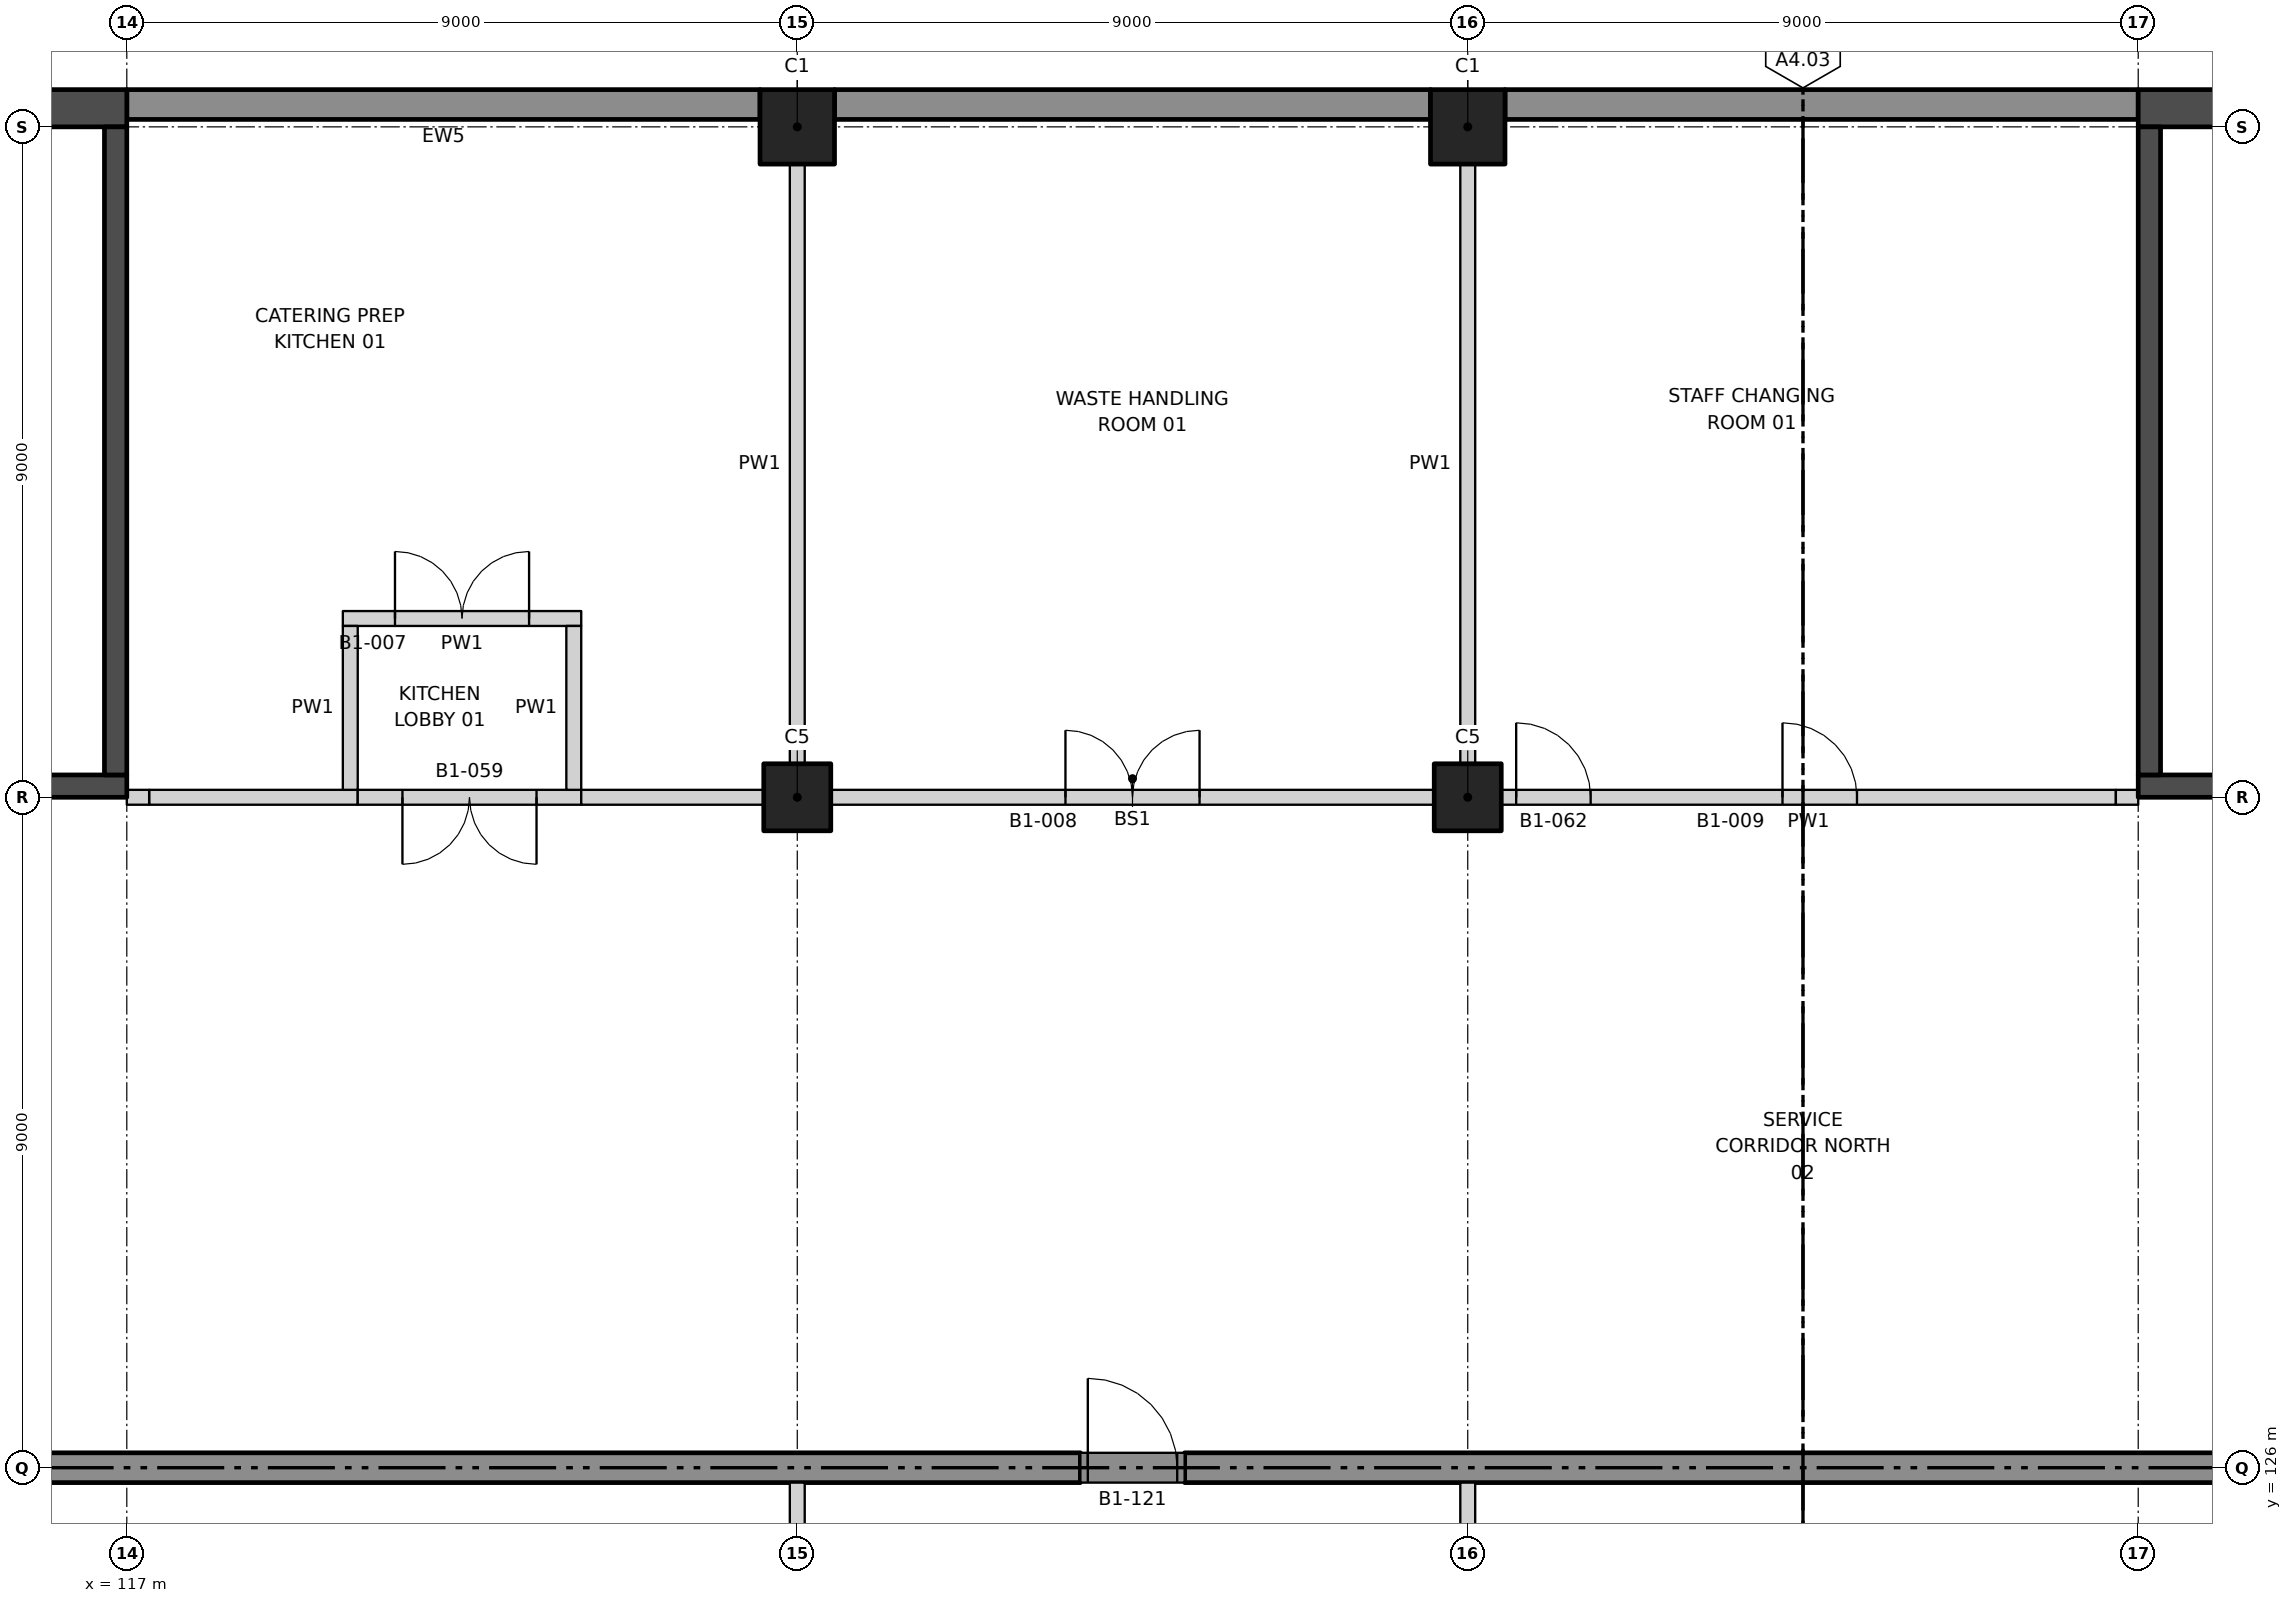
"""IFC4 building model, lengths in metres.
Left out: names, types, materials, properties, quantities, classifications, styles, units other than length and angle.
Written with IfcOpenShell. Run it as: python <this file> out.ifc"""

import sys

from ifc_helpers import new_model, si_unit, direction, frame, frame_2d, origin, origin_2d, place, context, subcontext, project, spatial, rectangle, extrude, element, fill, save


model = new_model("IFC4")
c1 = context("Model", 3, precision=1e-05, world=origin(), true_north=direction((0.0, 1.0)))
c2 = subcontext(c1, "Body", "Model", "MODEL_VIEW")
j1 = project(units=[si_unit("LENGTHUNIT", "METRE"), si_unit("PLANEANGLEUNIT", "RADIAN")], contexts=[c1])
p1 = place(None, origin())
s1 = spatial("IfcSite", under=j1, at=p1, CompositionType="ELEMENT")
p2 = place(p1, origin())
s2 = spatial("IfcBuilding", under=s1, at=p2, CompositionType="ELEMENT")
p3 = place(p2, frame((0.0, 0.0, -6.0)))
s3 = spatial("IfcBuildingStorey", under=s2, at=p3, CompositionType="ELEMENT", Elevation=-6.0)
for number, where, z_axis, x_axis in (
    (1, (126.0, 144.0, 0.0), (0.0, 0.0, 1.0), (1.0, 0.0, 0.0)),
    (2, (135.0, 144.0, 0.0), (0.0, 0.0, 1.0), (1.0, 0.0, 0.0)),
):
    element("IfcColumn", number, at=place(p3, frame(where, z_axis=z_axis, x_axis=x_axis)), inside=s3, PredefinedType="COLUMN", context=c2, shape_type="SweptSolid", body=[
        extrude(rectangle(XDim=1.0, YDim=1.0, at=origin_2d()), origin(), (0.0, 0.0, 1.0), 6.0),
    ])
for number, where, z_axis, x_axis in (
    (3, (126.0, 135.0, 0.0), (0.0, 0.0, 1.0), (1.0, 0.0, 0.0)),
    (4, (135.0, 135.0, 0.0), (0.0, 0.0, 1.0), (1.0, 0.0, 0.0)),
):
    element("IfcColumn", number, at=place(p3, frame(where, z_axis=z_axis, x_axis=x_axis)), inside=s3, PredefinedType="COLUMN", context=c2, shape_type="SweptSolid", body=[
        extrude(rectangle(XDim=0.9, YDim=0.9, at=origin_2d()), origin(), (0.0, 0.0, 1.0), 6.0),
    ])
for number, where, z_axis, x_axis in (
    (5, (171.0, 126.0, 0.0), (0.0, 0.0, 1.0), (-1.0, 0.0, 0.0)),
    (6, (129.8, 126.0, 0.0), (0.0, 0.0, 1.0), (-1.0, 0.0, 0.0)),
):
    element("IfcWall", number, at=place(p3, frame(where, z_axis=z_axis, x_axis=x_axis)), inside=s3, PredefinedType="SOLIDWALL", context=c2, shape_type="SweptSolid", body=[
        extrude(rectangle(XDim=39.8, YDim=0.4, at=frame_2d((19.9, 0.0))), origin(), (0.0, 0.0, 1.0), 6.0),
    ])
p4 = place(p3, frame((129.8, 126.0, 0.0), z_axis=(0.0, 0.0, 1.0), x_axis=(1.0, 0.0, 0.0)))
e7 = element("IfcWall", 7, at=p4, inside=s3, PredefinedType="SOLIDWALL", context=c2, shape_type="SweptSolid", body=[
    extrude(rectangle(XDim=1.4, YDim=0.4, at=frame_2d((0.7, 0.0))), origin(), (0.0, 0.0, 1.0), 5.0),
])
p5 = place(p4, frame((0.1, 0.0, 0.0)))
e8 = element("IfcOpeningElement", 8, at=p5, cuts=e7, PredefinedType="OPENING", context=c2, shape_type="SweptSolid", body=[
    extrude(rectangle(XDim=1.2, YDim=2.1, at=frame_2d((0.6, 1.05))), frame((0.0, 0.21, 0.0), z_axis=(0.0, -1.0, 0.0), x_axis=(1.0, 0.0, 0.0)), (0.0, 0.0, 1.0), 0.42),
])
p6 = place(p3, frame((117.3, 135.0, 0.0), z_axis=(0.0, 0.0, 1.0), x_axis=(1.0, 0.0, 0.0)))
e9 = element("IfcWall", 9, at=p6, inside=s3, PredefinedType="PARTITIONING", context=c2, shape_type="SweptSolid", body=[
    extrude(rectangle(XDim=2.8, YDim=0.2, at=frame_2d((1.4, 0.0))), origin(), (0.0, 0.0, 1.0), 4.65),
])
p7 = place(p3, frame((120.1, 135.0, 0.0), z_axis=(0.0, 0.0, 1.0), x_axis=(1.0, 0.0, 0.0)))
e10 = element("IfcWall", 10, at=p7, inside=s3, PredefinedType="PARTITIONING", context=c2, shape_type="SweptSolid", body=[
    extrude(rectangle(XDim=3.0, YDim=0.2, at=frame_2d((1.5, 0.0))), origin(), (0.0, 0.0, 1.0), 4.65),
])
p8 = place(p7, frame((0.6, 0.0, 0.0)))
e11 = element("IfcOpeningElement", 11, at=p8, cuts=e10, PredefinedType="OPENING", context=c2, shape_type="SweptSolid", body=[
    extrude(rectangle(XDim=1.8, YDim=2.1, at=frame_2d((0.9, 1.05))), frame((0.0, 0.11, 0.0), z_axis=(0.0, -1.0, 0.0), x_axis=(1.0, 0.0, 0.0)), (0.0, 0.0, 1.0), 0.22),
])
p9 = place(p3, frame((123.1, 135.0, 0.0), z_axis=(0.0, 0.0, 1.0), x_axis=(1.0, 0.0, 0.0)))
e12 = element("IfcWall", 12, at=p9, inside=s3, PredefinedType="PARTITIONING", context=c2, shape_type="SweptSolid", body=[
    extrude(rectangle(XDim=2.45, YDim=0.2, at=frame_2d((1.225, 0.0))), origin(), (0.0, 0.0, 1.0), 4.65),
])
p10 = place(p3, frame((126.45, 135.0, 0.0), z_axis=(0.0, 0.0, 1.0), x_axis=(1.0, 0.0, 0.0)))
e13 = element("IfcWall", 13, at=p10, inside=s3, PredefinedType="PARTITIONING", context=c2, shape_type="SweptSolid", body=[
    extrude(rectangle(XDim=8.1, YDim=0.2, at=frame_2d((4.05, 0.0))), origin(), (0.0, 0.0, 1.0), 4.65),
])
p11 = place(p10, frame((3.15, 0.0, 0.0)))
e14 = element("IfcOpeningElement", 14, at=p11, cuts=e13, PredefinedType="OPENING", context=c2, shape_type="SweptSolid", body=[
    extrude(rectangle(XDim=1.8, YDim=2.1, at=frame_2d((0.9, 1.05))), frame((0.0, 0.11, 0.0), z_axis=(0.0, -1.0, 0.0), x_axis=(1.0, 0.0, 0.0)), (0.0, 0.0, 1.0), 0.22),
])
p12 = place(p3, frame((135.45, 135.0, 0.0), z_axis=(0.0, 0.0, 1.0), x_axis=(1.0, 0.0, 0.0)))
e15 = element("IfcWall", 15, at=p12, inside=s3, PredefinedType="PARTITIONING", context=c2, shape_type="SweptSolid", body=[
    extrude(rectangle(XDim=8.25, YDim=0.2, at=frame_2d((4.125, 0.0))), origin(), (0.0, 0.0, 1.0), 4.65),
])
p13 = place(p12, frame((3.775, 0.0, 0.0)))
e16 = element("IfcOpeningElement", 16, at=p13, cuts=e15, PredefinedType="OPENING", context=c2, shape_type="SweptSolid", body=[
    extrude(rectangle(XDim=1.0, YDim=2.1, at=frame_2d((0.5, 1.05))), frame((0.0, 0.11, 0.0), z_axis=(0.0, -1.0, 0.0), x_axis=(1.0, 0.0, 0.0)), (0.0, 0.0, 1.0), 0.22),
])
p14 = place(p12, frame((0.2, 0.0, 0.0)))
e17 = element("IfcOpeningElement", 17, at=p14, cuts=e15, PredefinedType="OPENING", context=c2, shape_type="SweptSolid", body=[
    extrude(rectangle(XDim=1.0, YDim=2.1, at=frame_2d((0.5, 1.05))), frame((0.0, 0.11, 0.0), z_axis=(0.0, -1.0, 0.0), x_axis=(1.0, 0.0, 0.0)), (0.0, 0.0, 1.0), 0.22),
])
p15 = place(p3, frame((119.9, 137.4, 0.0), z_axis=(0.0, 0.0, 1.0), x_axis=(1.0, 0.0, 0.0)))
e18 = element("IfcWall", 18, at=p15, inside=s3, PredefinedType="PARTITIONING", context=c2, shape_type="SweptSolid", body=[
    extrude(rectangle(XDim=3.2, YDim=0.2, at=frame_2d((1.6, 0.0))), origin(), (0.0, 0.0, 1.0), 6.0),
])
p16 = place(p15, frame((0.7, 0.0, 0.0)))
e19 = element("IfcOpeningElement", 19, at=p16, cuts=e18, PredefinedType="OPENING", context=c2, shape_type="SweptSolid", body=[
    extrude(rectangle(XDim=1.8, YDim=2.1, at=frame_2d((0.9, 1.05))), frame((0.0, 0.11, 0.0), z_axis=(0.0, -1.0, 0.0), x_axis=(1.0, 0.0, 0.0)), (0.0, 0.0, 1.0), 0.22),
])
for number, where, z_axis, x_axis in (
    (20, (120.0, 135.1, 0.0), (0.0, 0.0, 1.0), (0.0, 1.0, 0.0)),
    (21, (123.0, 135.1, 0.0), (0.0, 0.0, 1.0), (0.0, 1.0, 0.0)),
):
    element("IfcWall", number, at=place(p3, frame(where, z_axis=z_axis, x_axis=x_axis)), inside=s3, PredefinedType="PARTITIONING", context=c2, shape_type="SweptSolid", body=[
        extrude(rectangle(XDim=2.2, YDim=0.2, at=frame_2d((1.1, 0.0))), origin(), (0.0, 0.0, 1.0), 6.0),
    ])
p17 = place(p3, frame((126.0, 117.5, 0.0), z_axis=(0.0, 0.0, 1.0), x_axis=(0.0, 1.0, 0.0)))
e22 = element("IfcWall", 22, at=p17, inside=s3, PredefinedType="PARTITIONING", context=c2, shape_type="SweptSolid", body=[
    extrude(rectangle(XDim=8.3, YDim=0.2, at=frame_2d((4.15, 0.0))), origin(), (0.0, 0.0, 1.0), 4.65),
])
p18 = place(p17, frame((4.0, 0.0, 0.0)))
e23 = element("IfcOpeningElement", 23, at=p18, cuts=e22, PredefinedType="OPENING", context=c2, shape_type="SweptSolid", body=[
    extrude(rectangle(XDim=1.0, YDim=2.1, at=frame_2d((0.5, 1.05))), frame((0.0, 0.11, 0.0), z_axis=(0.0, -1.0, 0.0), x_axis=(1.0, 0.0, 0.0)), (0.0, 0.0, 1.0), 0.22),
])
p19 = place(p3, frame((126.0, 135.45, 0.0), z_axis=(0.0, 0.0, 1.0), x_axis=(0.0, 1.0, 0.0)))
e24 = element("IfcWall", 24, at=p19, inside=s3, PredefinedType="PARTITIONING", context=c2, shape_type="SweptSolid", body=[
    extrude(rectangle(XDim=8.05, YDim=0.2, at=frame_2d((4.025, 0.0))), origin(), (0.0, 0.0, 1.0), 4.65),
])
p20 = place(p3, frame((135.0, 117.5, 0.0), z_axis=(0.0, 0.0, 1.0), x_axis=(0.0, 1.0, 0.0)))
e25 = element("IfcWall", 25, at=p20, inside=s3, PredefinedType="PARTITIONING", context=c2, shape_type="SweptSolid", body=[
    extrude(rectangle(XDim=8.3, YDim=0.2, at=frame_2d((4.15, 0.0))), origin(), (0.0, 0.0, 1.0), 4.65),
])
p21 = place(p20, frame((4.0, 0.0, 0.0)))
e26 = element("IfcOpeningElement", 26, at=p21, cuts=e25, PredefinedType="OPENING", context=c2, shape_type="SweptSolid", body=[
    extrude(rectangle(XDim=1.0, YDim=2.1, at=frame_2d((0.5, 1.05))), frame((0.0, 0.11, 0.0), z_axis=(0.0, -1.0, 0.0), x_axis=(1.0, 0.0, 0.0)), (0.0, 0.0, 1.0), 0.22),
])
p22 = place(p3, frame((135.0, 135.45, 0.0), z_axis=(0.0, 0.0, 1.0), x_axis=(0.0, 1.0, 0.0)))
e27 = element("IfcWall", 27, at=p22, inside=s3, PredefinedType="PARTITIONING", context=c2, shape_type="SweptSolid", body=[
    extrude(rectangle(XDim=8.05, YDim=0.2, at=frame_2d((4.025, 0.0))), origin(), (0.0, 0.0, 1.0), 4.65),
])
p23 = place(p3, frame((125.5, 144.3, 0.0), z_axis=(0.0, 0.0, 1.0), x_axis=(-1.0, 0.0, 0.0)))
e28 = element("IfcWall", 28, at=p23, inside=s3, PredefinedType="SOLIDWALL", context=c2, shape_type="SweptSolid", body=[
    extrude(rectangle(XDim=8.5, YDim=0.4, at=frame_2d((4.25, 0.0))), origin(), (0.0, 0.0, 1.0), 6.0),
])
p24 = place(p3, frame((134.5, 144.3, 0.0), z_axis=(0.0, 0.0, 1.0), x_axis=(-1.0, 0.0, 0.0)))
e29 = element("IfcWall", 29, at=p24, inside=s3, PredefinedType="SOLIDWALL", context=c2, shape_type="SweptSolid", body=[
    extrude(rectangle(XDim=8.0, YDim=0.4, at=frame_2d((4.0, 0.0))), origin(), (0.0, 0.0, 1.0), 6.0),
])
p25 = place(p3, frame((144.0, 144.3, 0.0), z_axis=(0.0, 0.0, 1.0), x_axis=(-1.0, 0.0, 0.0)))
e30 = element("IfcWall", 30, at=p25, inside=s3, PredefinedType="SOLIDWALL", context=c2, shape_type="SweptSolid", body=[
    extrude(rectangle(XDim=8.5, YDim=0.4, at=frame_2d((4.25, 0.0))), origin(), (0.0, 0.0, 1.0), 6.0),
])
p26 = place(p3, frame((117.0, 135.15, 0.0), z_axis=(0.0, 0.0, 1.0), x_axis=(-1.0, 0.0, 0.0)))
e31 = element("IfcWall", 31, at=p26, inside=s3, PredefinedType="SHEAR", context=c2, shape_type="SweptSolid", body=[
    extrude(rectangle(XDim=18.0, YDim=0.3, at=frame_2d((9.0, 0.0))), origin(), (0.0, 0.0, 1.0), 6.0),
])
p27 = place(p26, frame((1.5, 0.0, 0.0)))
e32 = element("IfcOpeningElement", 32, at=p27, cuts=e31, PredefinedType="OPENING", context=c2, shape_type="SweptSolid", body=[
    extrude(rectangle(XDim=1.2, YDim=2.1, at=frame_2d((0.6, 1.05))), frame((0.0, 0.16, 0.0), z_axis=(0.0, -1.0, 0.0), x_axis=(1.0, 0.0, 0.0)), (0.0, 0.0, 1.0), 0.32),
])
p28 = place(p3, frame((117.0, 144.25, 0.0), z_axis=(0.0, 0.0, 1.0), x_axis=(-1.0, 0.0, 0.0)))
e33 = element("IfcWall", 33, at=p28, inside=s3, PredefinedType="SHEAR", context=c2, shape_type="SweptSolid", body=[
    extrude(rectangle(XDim=18.0, YDim=0.5, at=frame_2d((9.0, 0.0))), origin(), (0.0, 0.0, 1.0), 6.0),
])
p29 = place(p3, frame((116.85, 135.3, 0.0), z_axis=(0.0, 0.0, 1.0), x_axis=(0.0, 1.0, 0.0)))
e34 = element("IfcWall", 34, at=p29, inside=s3, PredefinedType="SHEAR", context=c2, shape_type="SweptSolid", body=[
    extrude(rectangle(XDim=8.7, YDim=0.3, at=frame_2d((4.35, 0.0))), origin(), (0.0, 0.0, 1.0), 6.0),
])
p30 = place(p3, frame((144.0, 135.15, 0.0), z_axis=(0.0, 0.0, 1.0), x_axis=(1.0, 0.0, 0.0)))
e35 = element("IfcWall", 35, at=p30, inside=s3, PredefinedType="SHEAR", context=c2, shape_type="SweptSolid", body=[
    extrude(rectangle(XDim=18.0, YDim=0.3, at=frame_2d((9.0, 0.0))), origin(), (0.0, 0.0, 1.0), 6.0),
])
p31 = place(p30, frame((1.5, 0.0, 0.0)))
e36 = element("IfcOpeningElement", 36, at=p31, cuts=e35, PredefinedType="OPENING", context=c2, shape_type="SweptSolid", body=[
    extrude(rectangle(XDim=1.2, YDim=2.1, at=frame_2d((0.6, 1.05))), frame((0.0, 0.16, 0.0), z_axis=(0.0, -1.0, 0.0), x_axis=(1.0, 0.0, 0.0)), (0.0, 0.0, 1.0), 0.32),
])
p32 = place(p3, frame((144.0, 144.25, 0.0), z_axis=(0.0, 0.0, 1.0), x_axis=(1.0, 0.0, 0.0)))
e37 = element("IfcWall", 37, at=p32, inside=s3, PredefinedType="SHEAR", context=c2, shape_type="SweptSolid", body=[
    extrude(rectangle(XDim=18.0, YDim=0.5, at=frame_2d((9.0, 0.0))), origin(), (0.0, 0.0, 1.0), 6.0),
])
p33 = place(p3, frame((144.15, 135.3, 0.0), z_axis=(0.0, 0.0, 1.0), x_axis=(0.0, 1.0, 0.0)))
e38 = element("IfcWall", 38, at=p33, inside=s3, PredefinedType="SHEAR", context=c2, shape_type="SweptSolid", body=[
    extrude(rectangle(XDim=8.7, YDim=0.3, at=frame_2d((4.35, 0.0))), origin(), (0.0, 0.0, 1.0), 6.0),
])
for number, where, z_axis, x_axis in (
    (39, (117.0, 135.0, 0.0), (0.0, 0.0, 1.0), (1.0, 0.0, 0.0)),
    (40, (143.7, 135.0, 0.0), (0.0, 0.0, 1.0), (1.0, 0.0, 0.0)),
):
    element("IfcWall", number, at=place(p3, frame(where, z_axis=z_axis, x_axis=x_axis)), inside=s3, PredefinedType="PARTITIONING", context=c2, shape_type="SweptSolid", body=[
        extrude(rectangle(XDim=0.3, YDim=0.2, at=frame_2d((0.15, 0.0))), origin(), (0.0, 0.0, 1.0), 6.0),
    ])
p34 = place(p16, origin())
e41 = element("IfcDoor", 41, at=p34, inside=s3, OperationType="DOUBLE_DOOR_DOUBLE_SWING", PredefinedType="DOOR", context=c2, shape_type="SweptSolid", body=[
    extrude(rectangle(XDim=1.8, YDim=2.1, at=frame_2d((0.9, 1.05))), frame((0.0, 0.025, 0.0), z_axis=(0.0, -1.0, 0.0), x_axis=(1.0, 0.0, 0.0)), (0.0, 0.0, 1.0), 0.05),
])
fill(e19, e41)
p35 = place(p11, origin())
e42 = element("IfcDoor", 42, at=p35, inside=s3, OperationType="DOUBLE_DOOR_DOUBLE_SWING", PredefinedType="DOOR", context=c2, shape_type="SweptSolid", body=[
    extrude(rectangle(XDim=1.8, YDim=2.1, at=frame_2d((0.9, 1.05))), frame((0.0, 0.025, 0.0), z_axis=(0.0, -1.0, 0.0), x_axis=(1.0, 0.0, 0.0)), (0.0, 0.0, 1.0), 0.05),
])
fill(e14, e42)
p36 = place(p13, origin())
e43 = element("IfcDoor", 43, at=p36, inside=s3, OperationType="SINGLE_SWING_LEFT", PredefinedType="DOOR", context=c2, shape_type="SweptSolid", body=[
    extrude(rectangle(XDim=1.0, YDim=2.1, at=frame_2d((0.5, 1.05))), frame((0.0, 0.025, 0.0), z_axis=(0.0, -1.0, 0.0), x_axis=(1.0, 0.0, 0.0)), (0.0, 0.0, 1.0), 0.05),
])
fill(e16, e43)
p37 = place(p8, frame((1.8, 0.0, 0.0), z_axis=(0.0, 0.0, 1.0), x_axis=(-1.0, 0.0, 0.0)))
e44 = element("IfcDoor", 44, at=p37, inside=s3, OperationType="DOUBLE_DOOR_DOUBLE_SWING", PredefinedType="DOOR", context=c2, shape_type="SweptSolid", body=[
    extrude(rectangle(XDim=1.8, YDim=2.1, at=frame_2d((0.9, 1.05))), frame((0.0, 0.025, 0.0), z_axis=(0.0, -1.0, 0.0), x_axis=(1.0, 0.0, 0.0)), (0.0, 0.0, 1.0), 0.05),
])
fill(e11, e44)
p38 = place(p14, origin())
e45 = element("IfcDoor", 45, at=p38, inside=s3, OperationType="SINGLE_SWING_LEFT", PredefinedType="DOOR", context=c2, shape_type="SweptSolid", body=[
    extrude(rectangle(XDim=1.0, YDim=2.1, at=frame_2d((0.5, 1.05))), frame((0.0, 0.025, 0.0), z_axis=(0.0, -1.0, 0.0), x_axis=(1.0, 0.0, 0.0)), (0.0, 0.0, 1.0), 0.05),
])
fill(e17, e45)
p39 = place(p5, origin())
e46 = element("IfcDoor", 46, at=p39, inside=s3, OperationType="SINGLE_SWING_LEFT", PredefinedType="DOOR", context=c2, shape_type="SweptSolid", body=[
    extrude(rectangle(XDim=1.2, YDim=2.1, at=frame_2d((0.6, 1.05))), frame((0.0, 0.025, 0.0), z_axis=(0.0, -1.0, 0.0), x_axis=(1.0, 0.0, 0.0)), (0.0, 0.0, 1.0), 0.05),
])
fill(e8, e46)
save(model, sys.argv[1])
